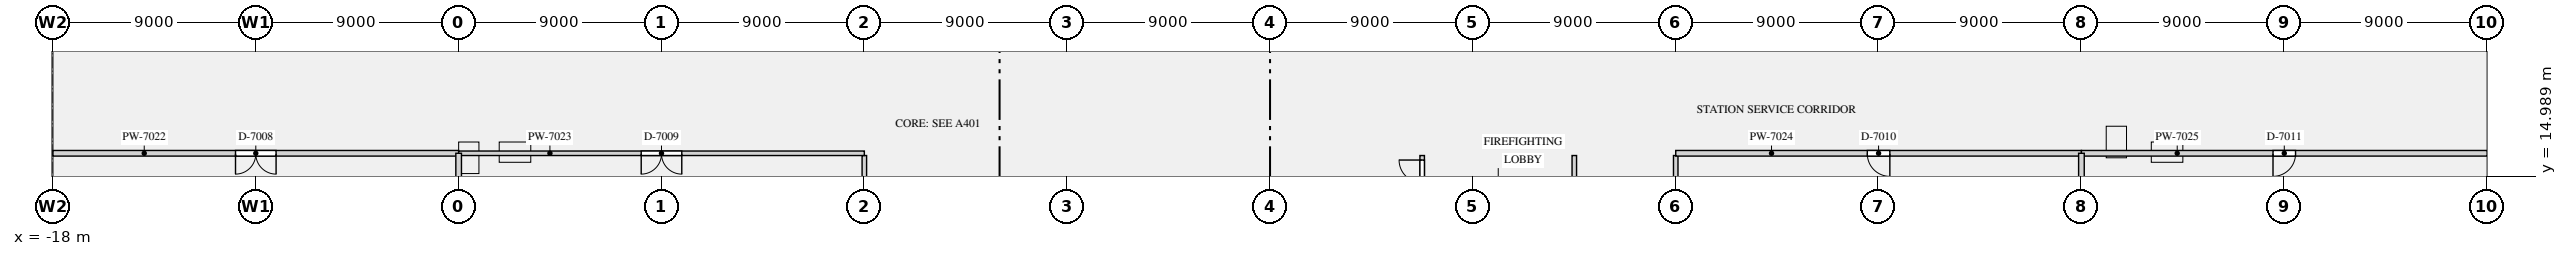
"""IFC4 building model, lengths in metres.
Left out: names, types, materials, properties, quantities, classifications, styles, units other than length and angle.
Written with IfcOpenShell. Run it as: python <this file> out.ifc"""

import sys

from ifc_helpers import new_model, si_unit, direction, frame, frame_2d, origin, origin_2d, place, context, subcontext, project, spatial, rectangle, extrude, element, fill, save


model = new_model("IFC4")
c1 = context("Model", 3, precision=1e-05, world=origin(), true_north=direction((0.0, 1.0)))
c2 = subcontext(c1, "Body", "Model", "MODEL_VIEW")
j1 = project(units=[si_unit("LENGTHUNIT", "METRE"), si_unit("PLANEANGLEUNIT", "RADIAN")], contexts=[c1])
p1 = place(None, origin())
s1 = spatial("IfcSite", under=j1, at=p1, CompositionType="ELEMENT")
p2 = place(p1, origin())
s2 = spatial("IfcBuilding", under=s1, at=p2, CompositionType="ELEMENT")
p3 = place(p2, frame((0.0, 0.0, -6.0)))
s3 = spatial("IfcBuildingStorey", under=s2, at=p3, CompositionType="ELEMENT", Elevation=-6.0)
for number, where, z_axis, x_axis in (
    (1, (75.8, 16.05, -0.5), (0.0, 0.0, 1.0), (-1.0, 0.0, 0.0)),
    (2, (73.55, 16.5, -0.5), (0.0, 0.0, 1.0), (0.0, 1.0, 0.0)),
    (3, (2.5, 16.05, -0.5), (0.0, 0.0, 1.0), (-1.0, 0.0, 0.0)),
    (4, (0.45, 15.8, -0.5), (0.0, 0.0, 1.0), (0.0, -1.0, 0.0)),
):
    element("IfcColumn", number, at=place(p3, frame(where, z_axis=z_axis, x_axis=x_axis)), inside=s3, PredefinedType="USERDEFINED", context=c2, shape_type="SweptSolid", body=[
        extrude(rectangle(XDim=1.4, YDim=0.9, at=origin_2d()), origin(), (0.0, 0.0, 1.0), 6.5),
    ])
p4 = place(p3, frame((18.0, 12.5, 0.0), z_axis=(0.0, 0.0, 1.0), x_axis=(0.0, 1.0, 0.0)))
e5 = element("IfcWall", 5, at=p4, inside=s3, PredefinedType="PARTITIONING", context=c2, shape_type="SweptSolid", body=[
    extrude(rectangle(XDim=3.4, YDim=0.2, at=frame_2d((1.7, 0.0))), origin(), (0.0, 0.0, 1.0), 5.598),
])
p5 = place(p3, frame((42.75, 12.5, 0.0), z_axis=(0.0, 0.0, 1.0), x_axis=(0.0, 1.0, 0.0)))
e6 = element("IfcWall", 6, at=p5, inside=s3, PredefinedType="PARTITIONING", context=c2, shape_type="SweptSolid", body=[
    extrude(rectangle(XDim=3.4, YDim=0.2, at=frame_2d((1.7, 0.0))), origin(), (0.0, 0.0, 1.0), 5.598),
])
p6 = place(p5, frame((2.2, 0.0, 0.0)))
e7 = element("IfcOpeningElement", 7, at=p6, cuts=e6, PredefinedType="OPENING", context=c2, shape_type="SweptSolid", body=[
    extrude(rectangle(XDim=1.0, YDim=2.1, at=frame_2d((0.5, 1.05))), frame((0.0, 0.11, 0.0), z_axis=(0.0, -1.0, 0.0), x_axis=(1.0, 0.0, 0.0)), (0.0, 0.0, 1.0), 0.22),
])
p7 = place(p3, frame((49.5, 12.5, 0.0), z_axis=(0.0, 0.0, 1.0), x_axis=(0.0, 1.0, 0.0)))
e8 = element("IfcWall", 8, at=p7, inside=s3, PredefinedType="PARTITIONING", context=c2, shape_type="SweptSolid", body=[
    extrude(rectangle(XDim=3.4, YDim=0.2, at=frame_2d((1.7, 0.0))), origin(), (0.0, 0.0, 1.0), 5.598),
])
p8 = place(p7, frame((1.15, 0.0, 0.0)))
e9 = element("IfcOpeningElement", 9, at=p8, cuts=e8, PredefinedType="OPENING", context=c2, shape_type="SweptSolid", body=[
    extrude(rectangle(XDim=1.1, YDim=2.1, at=frame_2d((0.55, 1.05))), frame((0.0, 0.11, 0.0), z_axis=(0.0, -1.0, 0.0), x_axis=(1.0, 0.0, 0.0)), (0.0, 0.0, 1.0), 0.22),
])
p9 = place(p3, frame((54.0, 12.5, 0.0), z_axis=(0.0, 0.0, 1.0), x_axis=(0.0, 1.0, 0.0)))
e10 = element("IfcWall", 10, at=p9, inside=s3, PredefinedType="PARTITIONING", context=c2, shape_type="SweptSolid", body=[
    extrude(rectangle(XDim=3.4, YDim=0.2, at=frame_2d((1.7, 0.0))), origin(), (0.0, 0.0, 1.0), 5.598),
])
p10 = place(p3, frame((-18.0, 16.0, 0.0), z_axis=(0.0, 0.0, 1.0), x_axis=(1.0, 0.0, 0.0)))
e11 = element("IfcWall", 11, at=p10, inside=s3, PredefinedType="PARTITIONING", context=c2, shape_type="SweptSolid", body=[
    extrude(rectangle(XDim=18.0, YDim=0.25, at=frame_2d((9.0, 0.0))), origin(), (0.0, 0.0, 1.0), 5.598),
])
p11 = place(p10, frame((8.1, 0.0, 0.0)))
e12 = element("IfcOpeningElement", 12, at=p11, cuts=e11, PredefinedType="OPENING", context=c2, shape_type="SweptSolid", body=[
    extrude(rectangle(XDim=1.8, YDim=2.4, at=frame_2d((0.9, 1.2))), frame((0.0, 0.135, 0.0), z_axis=(0.0, -1.0, 0.0), x_axis=(1.0, 0.0, 0.0)), (0.0, 0.0, 1.0), 0.27),
])
p12 = place(p3, frame((0.0, 16.0, 0.0), z_axis=(0.0, 0.0, 1.0), x_axis=(1.0, 0.0, 0.0)))
e13 = element("IfcWall", 13, at=p12, inside=s3, PredefinedType="PARTITIONING", context=c2, shape_type="SweptSolid", body=[
    extrude(rectangle(XDim=18.0, YDim=0.2, at=frame_2d((9.0, 0.0))), origin(), (0.0, 0.0, 1.0), 5.598),
])
p13 = place(p12, frame((8.1, 0.0, 0.0)))
e14 = element("IfcOpeningElement", 14, at=p13, cuts=e13, PredefinedType="OPENING", context=c2, shape_type="SweptSolid", body=[
    extrude(rectangle(XDim=1.8, YDim=2.4, at=frame_2d((0.9, 1.2))), frame((0.0, 0.11, 0.0), z_axis=(0.0, -1.0, 0.0), x_axis=(1.0, 0.0, 0.0)), (0.0, 0.0, 1.0), 0.22),
])
p14 = place(p3, frame((54.0, 16.0, 0.0), z_axis=(0.0, 0.0, 1.0), x_axis=(1.0, 0.0, 0.0)))
e15 = element("IfcWall", 15, at=p14, inside=s3, PredefinedType="PARTITIONING", context=c2, shape_type="SweptSolid", body=[
    extrude(rectangle(XDim=18.0, YDim=0.25, at=frame_2d((9.0, 0.0))), origin(), (0.0, 0.0, 1.0), 5.598),
])
p15 = place(p14, frame((8.5, 0.0, 0.0)))
e16 = element("IfcOpeningElement", 16, at=p15, cuts=e15, PredefinedType="OPENING", context=c2, shape_type="SweptSolid", body=[
    extrude(rectangle(XDim=1.0, YDim=2.1, at=frame_2d((0.5, 1.05))), frame((0.0, 0.135, 0.0), z_axis=(0.0, -1.0, 0.0), x_axis=(1.0, 0.0, 0.0)), (0.0, 0.0, 1.0), 0.27),
])
p16 = place(p3, frame((72.0, 16.0, 0.0), z_axis=(0.0, 0.0, 1.0), x_axis=(1.0, 0.0, 0.0)))
e17 = element("IfcWall", 17, at=p16, inside=s3, PredefinedType="PARTITIONING", context=c2, shape_type="SweptSolid", body=[
    extrude(rectangle(XDim=18.0, YDim=0.25, at=frame_2d((9.0, 0.0))), origin(), (0.0, 0.0, 1.0), 5.598),
])
p17 = place(p16, frame((8.5, 0.0, 0.0)))
e18 = element("IfcOpeningElement", 18, at=p17, cuts=e17, PredefinedType="OPENING", context=c2, shape_type="SweptSolid", body=[
    extrude(rectangle(XDim=1.0, YDim=2.1, at=frame_2d((0.5, 1.05))), frame((0.0, 0.135, 0.0), z_axis=(0.0, -1.0, 0.0), x_axis=(1.0, 0.0, 0.0)), (0.0, 0.0, 1.0), 0.27),
])
for number, where, z_axis, x_axis in (
    (19, (0.0, 0.0, 0.0), (0.0, 0.0, 1.0), (0.0, 1.0, 0.0)),
    (20, (72.0, 0.0, 0.0), (0.0, 0.0, 1.0), (0.0, 1.0, 0.0)),
):
    element("IfcWall", number, at=place(p3, frame(where, z_axis=z_axis, x_axis=x_axis)), inside=s3, PredefinedType="PARTITIONING", context=c2, shape_type="SweptSolid", body=[
        extrude(rectangle(XDim=16.0, YDim=0.25, at=frame_2d((8.0, 0.0))), origin(), (0.0, 0.0, 1.0), 5.598),
    ])
p18 = place(p6, origin())
e21 = element("IfcDoor", 21, at=p18, inside=s3, OperationType="SINGLE_SWING_RIGHT", PredefinedType="DOOR", context=c2, shape_type="SweptSolid", body=[
    extrude(rectangle(XDim=1.0, YDim=2.1, at=frame_2d((0.5, 1.05))), frame((0.0, 0.025, 0.0), z_axis=(0.0, -1.0, 0.0), x_axis=(1.0, 0.0, 0.0)), (0.0, 0.0, 1.0), 0.05),
])
fill(e7, e21)
p19 = place(p11, frame((1.8, 0.0, 0.0), z_axis=(0.0, 0.0, 1.0), x_axis=(-1.0, 0.0, 0.0)))
e22 = element("IfcDoor", 22, at=p19, inside=s3, OperationType="DOUBLE_DOOR_SINGLE_SWING", PredefinedType="DOOR", context=c2, shape_type="SweptSolid", body=[
    extrude(rectangle(XDim=1.8, YDim=2.4, at=frame_2d((0.9, 1.2))), frame((0.0, 0.025, 0.0), z_axis=(0.0, -1.0, 0.0), x_axis=(1.0, 0.0, 0.0)), (0.0, 0.0, 1.0), 0.05),
])
fill(e12, e22)
p20 = place(p13, frame((1.8, 0.0, 0.0), z_axis=(0.0, 0.0, 1.0), x_axis=(-1.0, 0.0, 0.0)))
e23 = element("IfcDoor", 23, at=p20, inside=s3, OperationType="DOUBLE_DOOR_SINGLE_SWING", PredefinedType="DOOR", context=c2, shape_type="SweptSolid", body=[
    extrude(rectangle(XDim=1.8, YDim=2.4, at=frame_2d((0.9, 1.2))), frame((0.0, 0.025, 0.0), z_axis=(0.0, -1.0, 0.0), x_axis=(1.0, 0.0, 0.0)), (0.0, 0.0, 1.0), 0.05),
])
fill(e14, e23)
p21 = place(p15, frame((1.0, 0.0, 0.0), z_axis=(0.0, 0.0, 1.0), x_axis=(-1.0, 0.0, 0.0)))
e24 = element("IfcDoor", 24, at=p21, inside=s3, OperationType="SINGLE_SWING_LEFT", PredefinedType="DOOR", context=c2, shape_type="SweptSolid", body=[
    extrude(rectangle(XDim=1.0, YDim=2.1, at=frame_2d((0.5, 1.05))), frame((0.0, 0.025, 0.0), z_axis=(0.0, -1.0, 0.0), x_axis=(1.0, 0.0, 0.0)), (0.0, 0.0, 1.0), 0.05),
])
fill(e16, e24)
p22 = place(p17, frame((1.0, 0.0, 0.0), z_axis=(0.0, 0.0, 1.0), x_axis=(-1.0, 0.0, 0.0)))
e25 = element("IfcDoor", 25, at=p22, inside=s3, OperationType="SINGLE_SWING_RIGHT", PredefinedType="DOOR", context=c2, shape_type="SweptSolid", body=[
    extrude(rectangle(XDim=1.0, YDim=2.1, at=frame_2d((0.5, 1.05))), frame((0.0, 0.025, 0.0), z_axis=(0.0, -1.0, 0.0), x_axis=(1.0, 0.0, 0.0)), (0.0, 0.0, 1.0), 0.05),
])
fill(e18, e25)
save(model, sys.argv[1])
